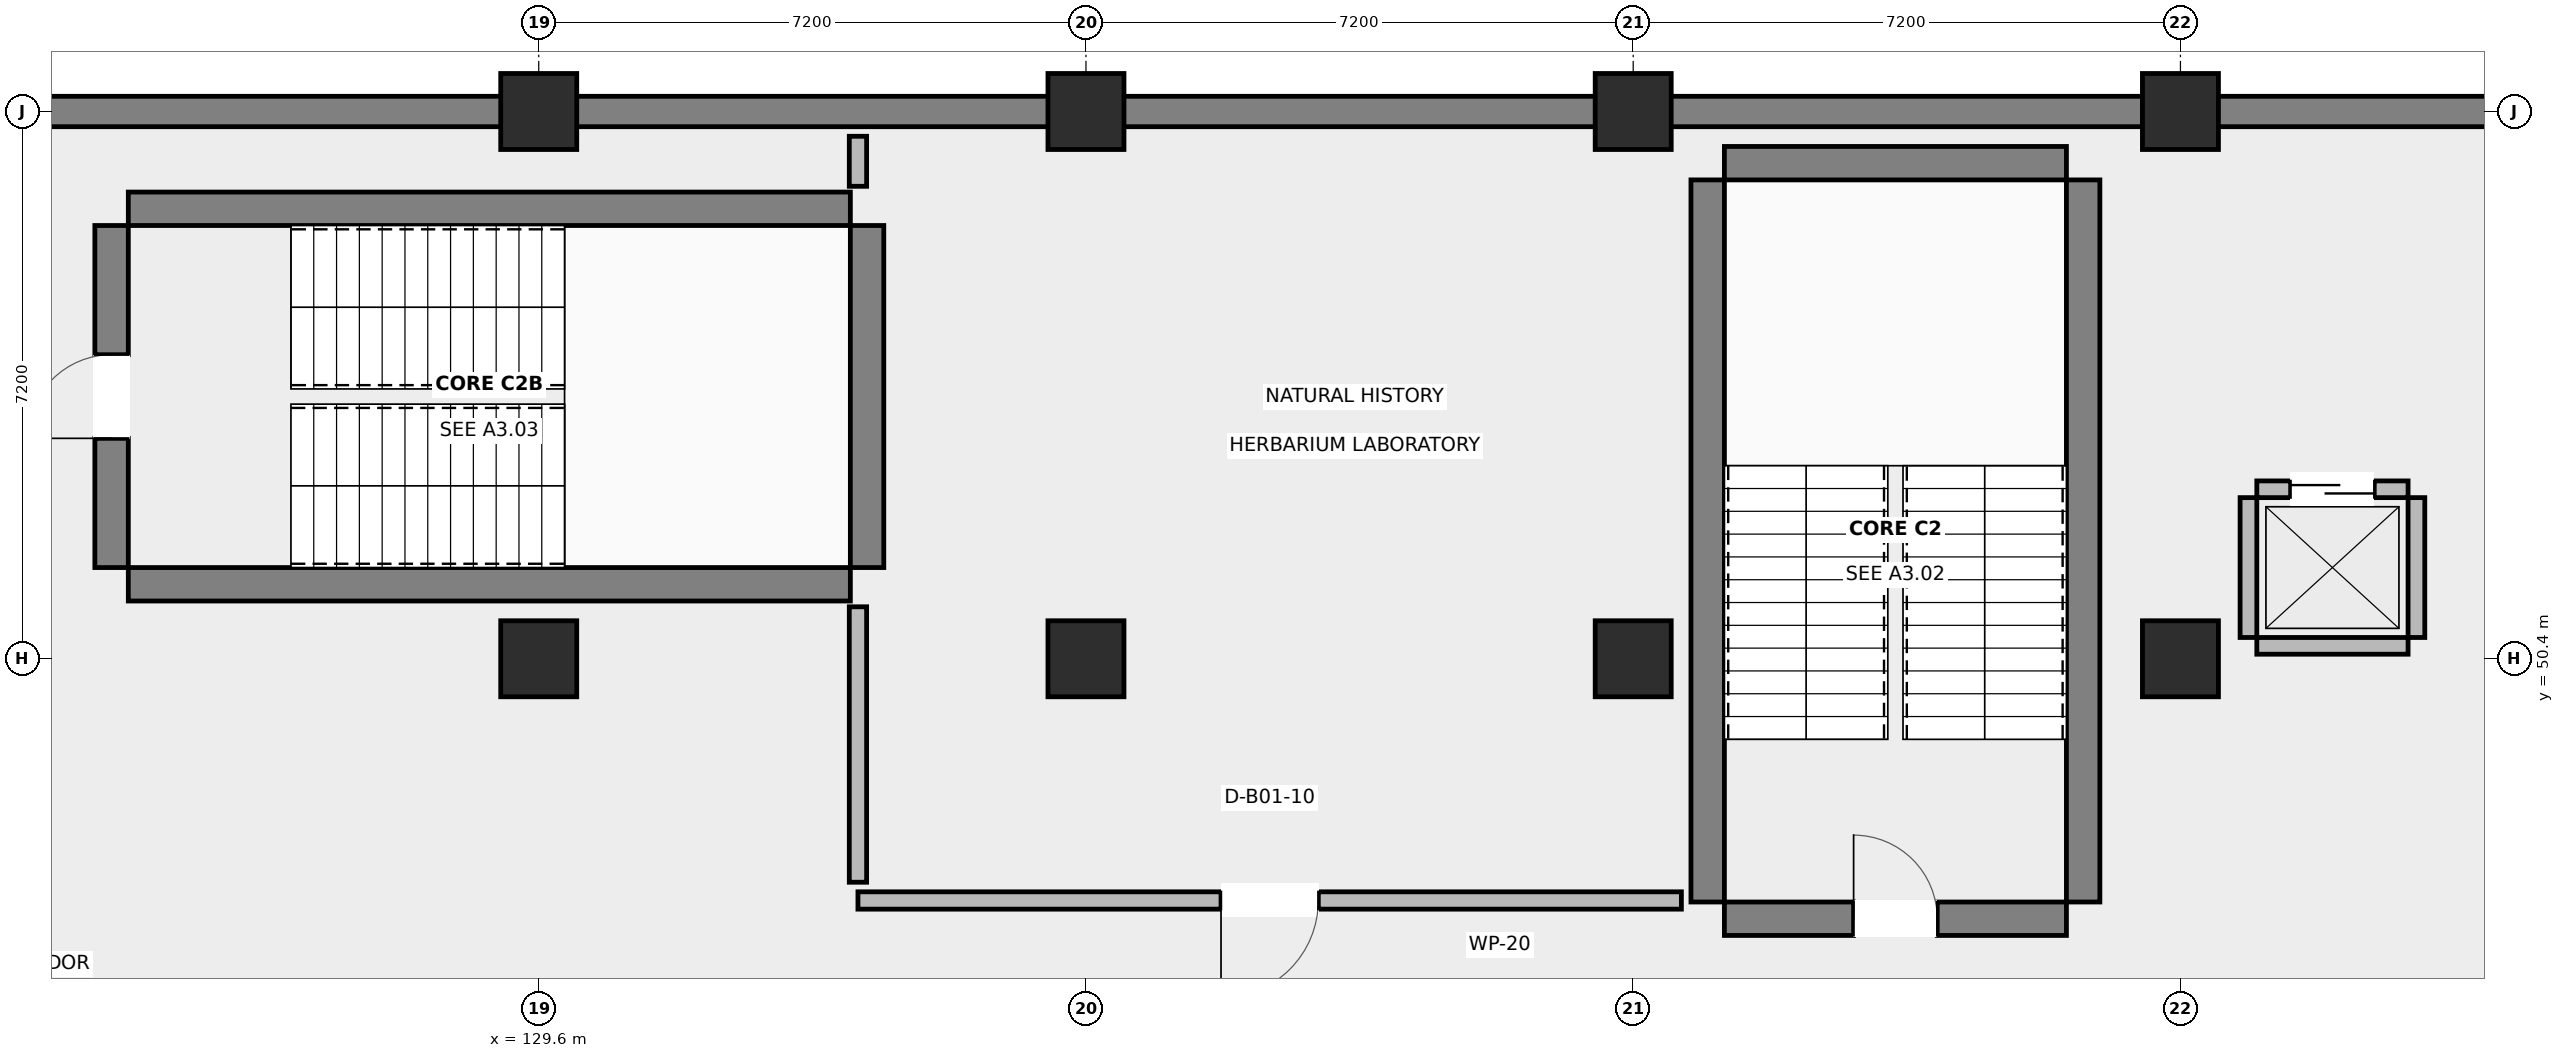
"""IFC4 building model, lengths in metres.
Left out: names, types, materials, properties, quantities, classifications, styles, units other than length and angle.
Written with IfcOpenShell. Run it as: python <this file> out.ifc"""

import sys

from ifc_helpers import new_model, si_unit, direction, frame, frame_2d, origin, origin_2d, place, context, subcontext, project, spatial, rectangle, extrude, element, fill, save


model = new_model("IFC4")
c1 = context("Model", 3, precision=1e-05, world=origin(), true_north=direction((0.0, 1.0)))
c2 = subcontext(c1, "Body", "Model", "MODEL_VIEW")
j1 = project(units=[si_unit("LENGTHUNIT", "METRE"), si_unit("PLANEANGLEUNIT", "RADIAN")], contexts=[c1])
p1 = place(None, origin())
s1 = spatial("IfcSite", under=j1, at=p1, CompositionType="ELEMENT")
p2 = place(p1, origin())
s2 = spatial("IfcBuilding", under=s1, at=p2, CompositionType="ELEMENT")
p3 = place(p2, frame((0.0, 0.0, -4.5)))
s3 = spatial("IfcBuildingStorey", under=s2, at=p3, CompositionType="ELEMENT", Elevation=-4.5)
for number, where, z_axis, x_axis in (
    (1, (129.6, 50.4, 0.0), (0.0, 0.0, 1.0), (1.0, 0.0, 0.0)),
    (2, (129.6, 57.6, 0.0), (0.0, 0.0, 1.0), (1.0, 0.0, 0.0)),
    (3, (136.8, 50.4, 0.0), (0.0, 0.0, 1.0), (1.0, 0.0, 0.0)),
    (4, (136.8, 57.6, 0.0), (0.0, 0.0, 1.0), (1.0, 0.0, 0.0)),
    (5, (144.0, 50.4, 0.0), (0.0, 0.0, 1.0), (1.0, 0.0, 0.0)),
    (6, (144.0, 57.6, 0.0), (0.0, 0.0, 1.0), (1.0, 0.0, 0.0)),
    (7, (151.2, 50.4, 0.0), (0.0, 0.0, 1.0), (1.0, 0.0, 0.0)),
    (8, (151.2, 57.6, 0.0), (0.0, 0.0, 1.0), (1.0, 0.0, 0.0)),
):
    element("IfcColumn", number, at=place(p3, frame(where, z_axis=z_axis, x_axis=x_axis)), inside=s3, PredefinedType="COLUMN", context=c2, shape_type="SweptSolid", body=[
        extrude(rectangle(XDim=1.0, YDim=1.0, at=origin_2d()), origin(), (0.0, 0.0, 1.0), 4.15),
    ])
p4 = place(p3, frame((115.2, 57.6, 0.0), z_axis=(0.0, 0.0, 1.0), x_axis=(1.0, 0.0, 0.0)))
e9 = element("IfcWall", 9, at=p4, inside=s3, PredefinedType="SOLIDWALL", context=c2, shape_type="SweptSolid", body=[
    extrude(rectangle(XDim=50.4, YDim=0.4, at=frame_2d((25.2, 0.0))), origin(), (0.0, 0.0, 1.0), 4.15),
])
p5 = place(p3, frame((145.2, 46.98, 0.0), z_axis=(0.0, 0.0, 1.0), x_axis=(1.0, 0.0, 0.0)))
e10 = element("IfcWall", 10, at=p5, inside=s3, PredefinedType="SHEAR", context=c2, shape_type="SweptSolid", body=[
    extrude(rectangle(XDim=4.5, YDim=0.44, at=frame_2d((2.25, 0.0))), origin(), (0.0, 0.0, 1.0), 4.15),
])
p6 = place(p5, frame((1.7, 0.0, 0.0)))
e11 = element("IfcOpeningElement", 11, at=p6, cuts=e10, PredefinedType="OPENING", context=c2, shape_type="SweptSolid", body=[
    extrude(rectangle(XDim=1.1, YDim=2.15, at=frame_2d((0.55, 1.075))), frame((0.0, 0.23, 0.0), z_axis=(0.0, -1.0, 0.0), x_axis=(1.0, 0.0, 0.0)), (0.0, 0.0, 1.0), 0.46),
])
p7 = place(p3, frame((145.2, 56.92, 0.0), z_axis=(0.0, 0.0, 1.0), x_axis=(1.0, 0.0, 0.0)))
e12 = element("IfcWall", 12, at=p7, inside=s3, PredefinedType="SHEAR", context=c2, shape_type="SweptSolid", body=[
    extrude(rectangle(XDim=4.5, YDim=0.44, at=frame_2d((2.25, 0.0))), origin(), (0.0, 0.0, 1.0), 4.15),
])
for number, where, z_axis, x_axis in (
    (13, (144.98, 47.2, 0.0), (0.0, 0.0, 1.0), (0.0, 1.0, 0.0)),
    (14, (149.92, 47.2, 0.0), (0.0, 0.0, 1.0), (0.0, 1.0, 0.0)),
    (15, (124.2, 51.38, 0.0), (0.0, 0.0, 1.0), (1.0, 0.0, 0.0)),
    (16, (124.2, 56.32, 0.0), (0.0, 0.0, 1.0), (1.0, 0.0, 0.0)),
):
    element("IfcWall", number, at=place(p3, frame(where, z_axis=z_axis, x_axis=x_axis)), inside=s3, PredefinedType="SHEAR", context=c2, shape_type="SweptSolid", body=[
        extrude(rectangle(XDim=9.5, YDim=0.44, at=frame_2d((4.75, 0.0))), origin(), (0.0, 0.0, 1.0), 4.15),
    ])
p8 = place(p3, frame((123.98, 51.6, 0.0), z_axis=(0.0, 0.0, 1.0), x_axis=(0.0, 1.0, 0.0)))
e17 = element("IfcWall", 17, at=p8, inside=s3, PredefinedType="SHEAR", context=c2, shape_type="SweptSolid", body=[
    extrude(rectangle(XDim=4.5, YDim=0.44, at=frame_2d((2.25, 0.0))), origin(), (0.0, 0.0, 1.0), 4.15),
])
p9 = place(p8, frame((1.7, 0.0, 0.0)))
e18 = element("IfcOpeningElement", 18, at=p9, cuts=e17, PredefinedType="OPENING", context=c2, shape_type="SweptSolid", body=[
    extrude(rectangle(XDim=1.1, YDim=2.15, at=frame_2d((0.55, 1.075))), frame((0.0, 0.23, 0.0), z_axis=(0.0, -1.0, 0.0), x_axis=(1.0, 0.0, 0.0)), (0.0, 0.0, 1.0), 0.46),
])
p10 = place(p3, frame((133.92, 51.6, 0.0), z_axis=(0.0, 0.0, 1.0), x_axis=(0.0, 1.0, 0.0)))
e19 = element("IfcWall", 19, at=p10, inside=s3, PredefinedType="SHEAR", context=c2, shape_type="SweptSolid", body=[
    extrude(rectangle(XDim=4.5, YDim=0.44, at=frame_2d((2.25, 0.0))), origin(), (0.0, 0.0, 1.0), 4.15),
])
p11 = place(p3, frame((152.205, 50.57, 0.0), z_axis=(0.0, 0.0, 1.0), x_axis=(1.0, 0.0, 0.0)))
e20 = element("IfcWall", 20, at=p11, inside=s3, PredefinedType="STANDARD", context=c2, shape_type="SweptSolid", body=[
    extrude(rectangle(XDim=1.99, YDim=0.22, at=frame_2d((0.995, 0.0))), origin(), (0.0, 0.0, 1.0), 3.19),
])
p12 = place(p3, frame((152.205, 52.63, 0.0), z_axis=(0.0, 0.0, 1.0), x_axis=(1.0, 0.0, 0.0)))
e21 = element("IfcWall", 21, at=p12, inside=s3, PredefinedType="STANDARD", context=c2, shape_type="SweptSolid", body=[
    extrude(rectangle(XDim=1.99, YDim=0.22, at=frame_2d((0.995, 0.0))), origin(), (0.0, 0.0, 1.0), 3.19),
])
p13 = place(p12, frame((0.445, 0.0, 0.0)))
e22 = element("IfcOpeningElement", 22, at=p13, cuts=e21, PredefinedType="OPENING", context=c2, shape_type="SweptSolid", body=[
    extrude(rectangle(XDim=1.1, YDim=2.15, at=frame_2d((0.55, 1.075))), frame((0.0, 0.12, 0.0), z_axis=(0.0, -1.0, 0.0), x_axis=(1.0, 0.0, 0.0)), (0.0, 0.0, 1.0), 0.24),
])
for number, where, z_axis, x_axis in (
    (23, (152.095, 50.68, 0.0), (0.0, 0.0, 1.0), (0.0, 1.0, 0.0)),
    (24, (154.305, 50.68, 0.0), (0.0, 0.0, 1.0), (0.0, 1.0, 0.0)),
):
    element("IfcWall", number, at=place(p3, frame(where, z_axis=z_axis, x_axis=x_axis)), inside=s3, PredefinedType="STANDARD", context=c2, shape_type="SweptSolid", body=[
        extrude(rectangle(XDim=1.84, YDim=0.22, at=frame_2d((0.92, 0.0))), origin(), (0.0, 0.0, 1.0), 3.19),
    ])
p14 = place(p3, frame((144.634, 47.22, 0.0), z_axis=(0.0, 0.0, 1.0), x_axis=(-1.0, 0.0, 0.0)))
e25 = element("IfcWall", 25, at=p14, inside=s3, PredefinedType="PARTITIONING", context=c2, shape_type="SweptSolid", body=[
    extrude(rectangle(XDim=10.834, YDim=0.228, at=frame_2d((5.417, 0.0))), origin(), (0.0, 0.0, 1.0), 3.19),
])
p15 = place(p14, frame((4.777, 0.0, 0.0)))
e26 = element("IfcOpeningElement", 26, at=p15, cuts=e25, PredefinedType="OPENING", context=c2, shape_type="SweptSolid", body=[
    extrude(rectangle(XDim=1.28, YDim=2.15, at=frame_2d((0.64, 1.075))), frame((0.0, 0.124, 0.0), z_axis=(0.0, -1.0, 0.0), x_axis=(1.0, 0.0, 0.0)), (0.0, 0.0, 1.0), 0.248),
])
p16 = place(p3, frame((133.8, 47.46, 0.0), z_axis=(0.0, 0.0, 1.0), x_axis=(0.0, 1.0, 0.0)))
e27 = element("IfcWall", 27, at=p16, inside=s3, PredefinedType="PARTITIONING", context=c2, shape_type="SweptSolid", body=[
    extrude(rectangle(XDim=3.624, YDim=0.228, at=frame_2d((1.812, 0.0))), origin(), (0.0, 0.0, 1.0), 3.19),
])
p17 = place(p3, frame((133.8, 56.616, 0.0), z_axis=(0.0, 0.0, 1.0), x_axis=(0.0, 1.0, 0.0)))
e28 = element("IfcWall", 28, at=p17, inside=s3, PredefinedType="PARTITIONING", context=c2, shape_type="SweptSolid", body=[
    extrude(rectangle(XDim=0.658, YDim=0.228, at=frame_2d((0.329, 0.0))), origin(), (0.0, 0.0, 1.0), 3.19),
])
p18 = place(p6, origin())
e29 = element("IfcDoor", 29, at=p18, inside=s3, OperationType="SINGLE_SWING_LEFT", PredefinedType="DOOR", context=c2, shape_type="SweptSolid", body=[
    extrude(rectangle(XDim=1.1, YDim=2.15, at=frame_2d((0.55, 1.075))), frame((0.0, 0.025, 0.0), z_axis=(0.0, -1.0, 0.0), x_axis=(1.0, 0.0, 0.0)), (0.0, 0.0, 1.0), 0.05),
])
fill(e11, e29)
p19 = place(p9, origin())
e30 = element("IfcDoor", 30, at=p19, inside=s3, OperationType="SINGLE_SWING_LEFT", PredefinedType="DOOR", context=c2, shape_type="SweptSolid", body=[
    extrude(rectangle(XDim=1.1, YDim=2.15, at=frame_2d((0.55, 1.075))), frame((0.0, 0.025, 0.0), z_axis=(0.0, -1.0, 0.0), x_axis=(1.0, 0.0, 0.0)), (0.0, 0.0, 1.0), 0.05),
])
fill(e18, e30)
p20 = place(p13, origin())
e31 = element("IfcDoor", 31, at=p20, inside=s3, OperationType="SLIDING_TO_LEFT", PredefinedType="DOOR", context=c2, shape_type="SweptSolid", body=[
    extrude(rectangle(XDim=1.1, YDim=2.15, at=frame_2d((0.55, 1.075))), frame((0.0, 0.025, 0.0), z_axis=(0.0, -1.0, 0.0), x_axis=(1.0, 0.0, 0.0)), (0.0, 0.0, 1.0), 0.05),
])
fill(e22, e31)
p21 = place(p15, origin())
e32 = element("IfcDoor", 32, at=p21, inside=s3, OperationType="SINGLE_SWING_RIGHT", PredefinedType="DOOR", context=c2, shape_type="SweptSolid", body=[
    extrude(rectangle(XDim=1.28, YDim=2.15, at=frame_2d((0.64, 1.075))), frame((0.0, 0.025, 0.0), z_axis=(0.0, -1.0, 0.0), x_axis=(1.0, 0.0, 0.0)), (0.0, 0.0, 1.0), 0.05),
])
fill(e26, e32)
save(model, sys.argv[1])
